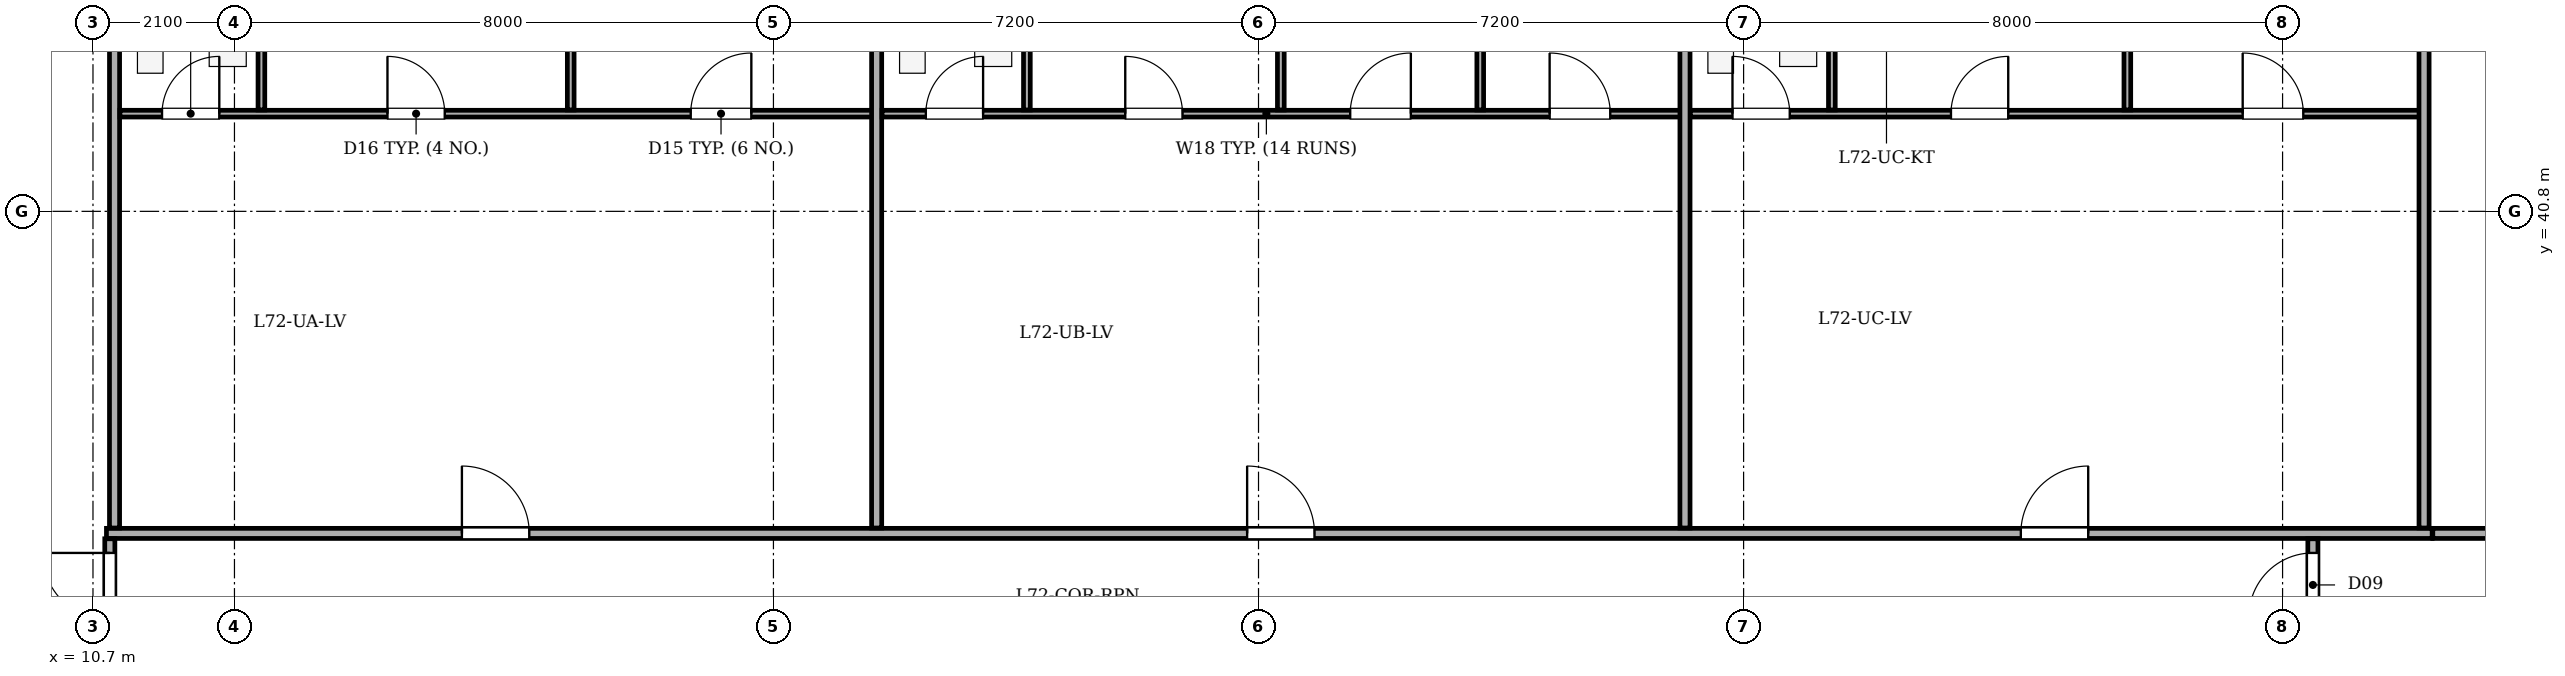
"""IFC4 building model, lengths in metres.
Left out: names, types, materials, properties, quantities, classifications, styles, units other than length and angle.
Written with IfcOpenShell. Run it as: python <this file> out.ifc"""

import sys

from ifc_helpers import new_model, si_unit, direction, frame, frame_2d, origin, place, context, subcontext, project, spatial, rectangle, extrude, element, fill, save


model = new_model("IFC4")
c1 = context("Model", 3, precision=1e-05, world=origin(), true_north=direction((0.0, 1.0)))
c2 = subcontext(c1, "Body", "Model", "MODEL_VIEW")
j1 = project(units=[si_unit("LENGTHUNIT", "METRE"), si_unit("PLANEANGLEUNIT", "RADIAN")], contexts=[c1])
p1 = place(None, origin())
s1 = spatial("IfcSite", under=j1, at=p1, CompositionType="ELEMENT")
p2 = place(p1, origin())
s2 = spatial("IfcBuilding", under=s1, at=p2, CompositionType="ELEMENT")
p3 = place(p2, frame((0.0, 0.0, 272.1)))
s3 = spatial("IfcBuildingStorey", under=s2, at=p3, CompositionType="ELEMENT", Elevation=272.1)
p4 = place(p3, frame((45.3, 44.92, 0.0), z_axis=(0.0, 0.0, 1.0), x_axis=(0.70712937715, -0.707084184501, 0.0)))
e1 = element("IfcWall", 1, at=p4, inside=s3, PredefinedType="STANDARD", context=c2, shape_type="SweptSolid", body=[
    extrude(rectangle(XDim=5.402, YDim=0.32, at=frame_2d((2.701, 0.0))), origin(), (0.0, 0.0, 1.0), 2.725),
])
p5 = place(p4, frame((2.001, 0.0, 0.75)))
e2 = element("IfcOpeningElement", 2, at=p5, cuts=e1, PredefinedType="OPENING", context=c2, shape_type="SweptSolid", body=[
    extrude(rectangle(XDim=1.4, YDim=1.65, at=frame_2d((0.7, 0.825))), frame((0.0, 0.17, 0.0), z_axis=(0.0, -1.0, 0.0), x_axis=(1.0, 0.0, 0.0)), (0.0, 0.0, 1.0), 0.34),
])
p6 = place(p3, frame((10.9, 36.02, 0.0), z_axis=(0.0, 0.0, 1.0), x_axis=(1.0, 0.0, 0.0)))
e3 = element("IfcWall", 3, at=p6, inside=s3, PredefinedType="PARTITIONING", context=c2, shape_type="SweptSolid", body=[
    extrude(rectangle(XDim=34.52, YDim=0.15, at=frame_2d((17.26, 0.0))), origin(), (0.0, 0.0, 1.0), 3.1),
])
p7 = place(p6, frame((5.276, 0.0, 0.0)))
e4 = element("IfcOpeningElement", 4, at=p7, cuts=e3, PredefinedType="OPENING", context=c2, shape_type="SweptSolid", body=[
    extrude(rectangle(XDim=1.0, YDim=2.1, at=frame_2d((0.5, 1.05))), frame((0.0, 0.085, 0.0), z_axis=(0.0, -1.0, 0.0), x_axis=(1.0, 0.0, 0.0)), (0.0, 0.0, 1.0), 0.17),
])
p8 = place(p6, frame((16.931, 0.0, 0.0)))
e5 = element("IfcOpeningElement", 5, at=p8, cuts=e3, PredefinedType="OPENING", context=c2, shape_type="SweptSolid", body=[
    extrude(rectangle(XDim=1.0, YDim=2.1, at=frame_2d((0.5, 1.05))), frame((0.0, 0.085, 0.0), z_axis=(0.0, -1.0, 0.0), x_axis=(1.0, 0.0, 0.0)), (0.0, 0.0, 1.0), 0.17),
])
p9 = place(p6, frame((28.415, 0.0, 0.0)))
e6 = element("IfcOpeningElement", 6, at=p9, cuts=e3, PredefinedType="OPENING", context=c2, shape_type="SweptSolid", body=[
    extrude(rectangle(XDim=1.0, YDim=2.1, at=frame_2d((0.5, 1.05))), frame((0.0, 0.085, 0.0), z_axis=(0.0, -1.0, 0.0), x_axis=(1.0, 0.0, 0.0)), (0.0, 0.0, 1.0), 0.17),
])
p10 = place(p3, frame((11.02, 36.1, 0.0), z_axis=(0.0, 0.0, 1.0), x_axis=(0.0, 1.0, 0.0)))
e7 = element("IfcWall", 7, at=p10, inside=s3, PredefinedType="PARTITIONING", context=c2, shape_type="SweptSolid", body=[
    extrude(rectangle(XDim=8.655, YDim=0.15, at=frame_2d((4.327, 0.0))), origin(), (0.0, 0.0, 1.0), 3.1),
])
p11 = place(p3, frame((11.1, 42.25, 0.0), z_axis=(0.0, 0.0, 1.0), x_axis=(1.0, 0.0, 0.0)))
e8 = element("IfcWall", 8, at=p11, inside=s3, PredefinedType="PARTITIONING", context=c2, shape_type="SweptSolid", body=[
    extrude(rectangle(XDim=11.272, YDim=0.1, at=frame_2d((5.636, 0.0))), origin(), (0.0, 0.0, 1.0), 3.1),
])
p12 = place(p11, frame((0.625, 0.0, 0.0)))
e9 = element("IfcOpeningElement", 9, at=p12, cuts=e8, PredefinedType="OPENING", context=c2, shape_type="SweptSolid", body=[
    extrude(rectangle(XDim=0.85, YDim=2.05, at=frame_2d((0.425, 1.025))), frame((0.0, 0.06, 0.0), z_axis=(0.0, -1.0, 0.0), x_axis=(1.0, 0.0, 0.0)), (0.0, 0.0, 1.0), 0.12),
])
p13 = place(p11, frame((3.971, 0.0, 0.0)))
e10 = element("IfcOpeningElement", 10, at=p13, cuts=e8, PredefinedType="OPENING", context=c2, shape_type="SweptSolid", body=[
    extrude(rectangle(XDim=0.85, YDim=2.05, at=frame_2d((0.425, 1.025))), frame((0.0, 0.06, 0.0), z_axis=(0.0, -1.0, 0.0), x_axis=(1.0, 0.0, 0.0)), (0.0, 0.0, 1.0), 0.12),
])
p14 = place(p11, frame((8.472, 0.0, 0.0)))
e11 = element("IfcOpeningElement", 11, at=p14, cuts=e8, PredefinedType="OPENING", context=c2, shape_type="SweptSolid", body=[
    extrude(rectangle(XDim=0.9, YDim=2.05, at=frame_2d((0.45, 1.025))), frame((0.0, 0.06, 0.0), z_axis=(0.0, -1.0, 0.0), x_axis=(1.0, 0.0, 0.0)), (0.0, 0.0, 1.0), 0.12),
])
p15 = place(p3, frame((13.2, 42.305, 0.0), z_axis=(0.0, 0.0, 1.0), x_axis=(0.0, 1.0, 0.0)))
e12 = element("IfcWall", 12, at=p15, inside=s3, PredefinedType="PARTITIONING", context=c2, shape_type="SweptSolid", body=[
    extrude(rectangle(XDim=2.45, YDim=0.1, at=frame_2d((1.225, 0.0))), origin(), (0.0, 0.0, 1.0), 3.1),
])
p16 = place(p3, frame((17.791, 42.305, 0.0), z_axis=(0.0, 0.0, 1.0), x_axis=(0.0, 1.0, 0.0)))
e13 = element("IfcWall", 13, at=p16, inside=s3, PredefinedType="PARTITIONING", context=c2, shape_type="SweptSolid", body=[
    extrude(rectangle(XDim=2.45, YDim=0.1, at=frame_2d((1.225, 0.0))), origin(), (0.0, 0.0, 1.0), 2.725),
])
p17 = place(p3, frame((22.332, 36.1, 0.0), z_axis=(0.0, 0.0, 1.0), x_axis=(0.0, 1.0, 0.0)))
e14 = element("IfcWall", 14, at=p17, inside=s3, PredefinedType="PARTITIONING", context=c2, shape_type="SweptSolid", body=[
    extrude(rectangle(XDim=8.655, YDim=0.15, at=frame_2d((4.327, 0.0))), origin(), (0.0, 0.0, 1.0), 2.725),
])
p18 = place(p3, frame((22.412, 42.25, 0.0), z_axis=(0.0, 0.0, 1.0), x_axis=(1.0, 0.0, 0.0)))
e15 = element("IfcWall", 15, at=p18, inside=s3, PredefinedType="PARTITIONING", context=c2, shape_type="SweptSolid", body=[
    extrude(rectangle(XDim=11.958, YDim=0.1, at=frame_2d((5.979, 0.0))), origin(), (0.0, 0.0, 1.0), 3.1),
])
p19 = place(p18, frame((0.65, 0.0, 0.0)))
e16 = element("IfcOpeningElement", 16, at=p19, cuts=e15, PredefinedType="OPENING", context=c2, shape_type="SweptSolid", body=[
    extrude(rectangle(XDim=0.85, YDim=2.05, at=frame_2d((0.425, 1.025))), frame((0.0, 0.06, 0.0), z_axis=(0.0, -1.0, 0.0), x_axis=(1.0, 0.0, 0.0)), (0.0, 0.0, 1.0), 0.12),
])
p20 = place(p18, frame((3.61, 0.0, 0.0)))
e17 = element("IfcOpeningElement", 17, at=p20, cuts=e15, PredefinedType="OPENING", context=c2, shape_type="SweptSolid", body=[
    extrude(rectangle(XDim=0.85, YDim=2.05, at=frame_2d((0.425, 1.025))), frame((0.0, 0.06, 0.0), z_axis=(0.0, -1.0, 0.0), x_axis=(1.0, 0.0, 0.0)), (0.0, 0.0, 1.0), 0.12),
])
p21 = place(p18, frame((6.949, 0.0, 0.0)))
e18 = element("IfcOpeningElement", 18, at=p21, cuts=e15, PredefinedType="OPENING", context=c2, shape_type="SweptSolid", body=[
    extrude(rectangle(XDim=0.9, YDim=2.05, at=frame_2d((0.45, 1.025))), frame((0.0, 0.06, 0.0), z_axis=(0.0, -1.0, 0.0), x_axis=(1.0, 0.0, 0.0)), (0.0, 0.0, 1.0), 0.12),
])
p22 = place(p18, frame((9.909, 0.0, 0.0)))
e19 = element("IfcOpeningElement", 19, at=p22, cuts=e15, PredefinedType="OPENING", context=c2, shape_type="SweptSolid", body=[
    extrude(rectangle(XDim=0.9, YDim=2.05, at=frame_2d((0.45, 1.025))), frame((0.0, 0.06, 0.0), z_axis=(0.0, -1.0, 0.0), x_axis=(1.0, 0.0, 0.0)), (0.0, 0.0, 1.0), 0.12),
])
for number, where, z_axis, x_axis in (
    (20, (24.562, 42.305, 0.0), (0.0, 0.0, 1.0), (0.0, 1.0, 0.0)),
    (21, (28.331, 42.305, 0.0), (0.0, 0.0, 1.0), (0.0, 1.0, 0.0)),
    (22, (31.291, 42.305, 0.0), (0.0, 0.0, 1.0), (0.0, 1.0, 0.0)),
):
    element("IfcWall", number, at=place(p3, frame(where, z_axis=z_axis, x_axis=x_axis)), inside=s3, PredefinedType="PARTITIONING", context=c2, shape_type="SweptSolid", body=[
        extrude(rectangle(XDim=2.45, YDim=0.1, at=frame_2d((1.225, 0.0))), origin(), (0.0, 0.0, 1.0), 3.1),
    ])
p23 = place(p3, frame((34.33, 36.1, 0.0), z_axis=(0.0, 0.0, 1.0), x_axis=(0.0, 1.0, 0.0)))
e23 = element("IfcWall", 23, at=p23, inside=s3, PredefinedType="PARTITIONING", context=c2, shape_type="SweptSolid", body=[
    extrude(rectangle(XDim=8.655, YDim=0.15, at=frame_2d((4.327, 0.0))), origin(), (0.0, 0.0, 1.0), 3.1),
])
p24 = place(p3, frame((34.41, 42.25, 0.0), z_axis=(0.0, 0.0, 1.0), x_axis=(1.0, 0.0, 0.0)))
e24 = element("IfcWall", 24, at=p24, inside=s3, PredefinedType="PARTITIONING", context=c2, shape_type="SweptSolid", body=[
    extrude(rectangle(XDim=10.93, YDim=0.1, at=frame_2d((5.465, 0.0))), origin(), (0.0, 0.0, 1.0), 3.1),
])
p25 = place(p24, frame((0.625, 0.0, 0.0)))
e25 = element("IfcOpeningElement", 25, at=p25, cuts=e24, PredefinedType="OPENING", context=c2, shape_type="SweptSolid", body=[
    extrude(rectangle(XDim=0.85, YDim=2.05, at=frame_2d((0.425, 1.025))), frame((0.0, 0.06, 0.0), z_axis=(0.0, -1.0, 0.0), x_axis=(1.0, 0.0, 0.0)), (0.0, 0.0, 1.0), 0.12),
])
p26 = place(p24, frame((3.868, 0.0, 0.0)))
e26 = element("IfcOpeningElement", 26, at=p26, cuts=e24, PredefinedType="OPENING", context=c2, shape_type="SweptSolid", body=[
    extrude(rectangle(XDim=0.85, YDim=2.05, at=frame_2d((0.425, 1.025))), frame((0.0, 0.06, 0.0), z_axis=(0.0, -1.0, 0.0), x_axis=(1.0, 0.0, 0.0)), (0.0, 0.0, 1.0), 0.12),
])
p27 = place(p24, frame((8.198, 0.0, 0.0)))
e27 = element("IfcOpeningElement", 27, at=p27, cuts=e24, PredefinedType="OPENING", context=c2, shape_type="SweptSolid", body=[
    extrude(rectangle(XDim=0.9, YDim=2.05, at=frame_2d((0.45, 1.025))), frame((0.0, 0.06, 0.0), z_axis=(0.0, -1.0, 0.0), x_axis=(1.0, 0.0, 0.0)), (0.0, 0.0, 1.0), 0.12),
])
p28 = place(p3, frame((36.51, 42.305, 0.0), z_axis=(0.0, 0.0, 1.0), x_axis=(0.0, 1.0, 0.0)))
e28 = element("IfcWall", 28, at=p28, inside=s3, PredefinedType="PARTITIONING", context=c2, shape_type="SweptSolid", body=[
    extrude(rectangle(XDim=2.45, YDim=0.1, at=frame_2d((1.225, 0.0))), origin(), (0.0, 0.0, 1.0), 2.725),
])
p29 = place(p3, frame((40.896, 42.305, 0.0), z_axis=(0.0, 0.0, 1.0), x_axis=(0.0, 1.0, 0.0)))
e29 = element("IfcWall", 29, at=p29, inside=s3, PredefinedType="PARTITIONING", context=c2, shape_type="SweptSolid", body=[
    extrude(rectangle(XDim=2.45, YDim=0.1, at=frame_2d((1.225, 0.0))), origin(), (0.0, 0.0, 1.0), 3.1),
])
p30 = place(p3, frame((45.3, 36.1, 0.0), z_axis=(0.0, 0.0, 1.0), x_axis=(0.0, 1.0, 0.0)))
e30 = element("IfcWall", 30, at=p30, inside=s3, PredefinedType="PARTITIONING", context=c2, shape_type="SweptSolid", body=[
    extrude(rectangle(XDim=8.655, YDim=0.15, at=frame_2d((4.327, 0.0))), origin(), (0.0, 0.0, 1.0), 3.1),
])
p31 = place(p3, frame((10.95, 34.15, 0.0), z_axis=(0.0, 0.0, 1.0), x_axis=(0.0, 1.0, 0.0)))
e31 = element("IfcWall", 31, at=p31, inside=s3, PredefinedType="PARTITIONING", context=c2, shape_type="SweptSolid", body=[
    extrude(rectangle(XDim=1.79, YDim=0.15, at=frame_2d((0.895, 0.0))), origin(), (0.0, 0.0, 1.0), 3.1),
])
p32 = place(p31, frame((0.58, 0.0, 0.0)))
e32 = element("IfcOpeningElement", 32, at=p32, cuts=e31, PredefinedType="OPENING", context=c2, shape_type="SweptSolid", body=[
    extrude(rectangle(XDim=1.0, YDim=2.1, at=frame_2d((0.5, 1.05))), frame((0.0, 0.085, 0.0), z_axis=(0.0, -1.0, 0.0), x_axis=(1.0, 0.0, 0.0)), (0.0, 0.0, 1.0), 0.17),
])
p33 = place(p3, frame((45.43, 36.02, 0.0), z_axis=(0.0, 0.0, 1.0), x_axis=(1.0, 0.0, 0.0)))
e33 = element("IfcWall", 33, at=p33, inside=s3, PredefinedType="PARTITIONING", context=c2, shape_type="SweptSolid", body=[
    extrude(rectangle(XDim=3.525, YDim=0.15, at=frame_2d((1.763, 0.0))), origin(), (0.0, 0.0, 1.0), 3.1),
])
p34 = place(p3, frame((43.65, 34.15, 0.0), z_axis=(0.0, 0.0, 1.0), x_axis=(0.0, 1.0, 0.0)))
e34 = element("IfcWall", 34, at=p34, inside=s3, PredefinedType="PARTITIONING", context=c2, shape_type="SweptSolid", body=[
    extrude(rectangle(XDim=1.79, YDim=0.15, at=frame_2d((0.895, 0.0))), origin(), (0.0, 0.0, 1.0), 3.1),
])
p35 = place(p34, frame((0.63, 0.0, 0.0)))
e35 = element("IfcOpeningElement", 35, at=p35, cuts=e34, PredefinedType="OPENING", context=c2, shape_type="SweptSolid", body=[
    extrude(rectangle(XDim=0.95, YDim=2.1, at=frame_2d((0.475, 1.05))), frame((0.0, 0.085, 0.0), z_axis=(0.0, -1.0, 0.0), x_axis=(1.0, 0.0, 0.0)), (0.0, 0.0, 1.0), 0.17),
])
p36 = place(p7, origin())
e36 = element("IfcDoor", 36, at=p36, inside=s3, OperationType="SINGLE_SWING_LEFT", PredefinedType="DOOR", context=c2, shape_type="SweptSolid", body=[
    extrude(rectangle(XDim=1.0, YDim=2.1, at=frame_2d((0.5, 1.05))), frame((0.0, 0.025, 0.0), z_axis=(0.0, -1.0, 0.0), x_axis=(1.0, 0.0, 0.0)), (0.0, 0.0, 1.0), 0.05),
])
fill(e4, e36)
p37 = place(p8, origin())
e37 = element("IfcDoor", 37, at=p37, inside=s3, OperationType="SINGLE_SWING_LEFT", PredefinedType="DOOR", context=c2, shape_type="SweptSolid", body=[
    extrude(rectangle(XDim=1.0, YDim=2.1, at=frame_2d((0.5, 1.05))), frame((0.0, 0.025, 0.0), z_axis=(0.0, -1.0, 0.0), x_axis=(1.0, 0.0, 0.0)), (0.0, 0.0, 1.0), 0.05),
])
fill(e5, e37)
p38 = place(p9, origin())
e38 = element("IfcDoor", 38, at=p38, inside=s3, OperationType="SINGLE_SWING_RIGHT", PredefinedType="DOOR", context=c2, shape_type="SweptSolid", body=[
    extrude(rectangle(XDim=1.0, YDim=2.1, at=frame_2d((0.5, 1.05))), frame((0.0, 0.025, 0.0), z_axis=(0.0, -1.0, 0.0), x_axis=(1.0, 0.0, 0.0)), (0.0, 0.0, 1.0), 0.05),
])
fill(e6, e38)
p39 = place(p12, origin())
e39 = element("IfcDoor", 39, at=p39, inside=s3, OperationType="SINGLE_SWING_RIGHT", PredefinedType="DOOR", context=c2, shape_type="SweptSolid", body=[
    extrude(rectangle(XDim=0.85, YDim=2.05, at=frame_2d((0.425, 1.025))), frame((0.0, 0.025, 0.0), z_axis=(0.0, -1.0, 0.0), x_axis=(1.0, 0.0, 0.0)), (0.0, 0.0, 1.0), 0.05),
])
fill(e9, e39)
p40 = place(p13, origin())
e40 = element("IfcDoor", 40, at=p40, inside=s3, OperationType="SINGLE_SWING_LEFT", PredefinedType="DOOR", context=c2, shape_type="SweptSolid", body=[
    extrude(rectangle(XDim=0.85, YDim=2.05, at=frame_2d((0.425, 1.025))), frame((0.0, 0.025, 0.0), z_axis=(0.0, -1.0, 0.0), x_axis=(1.0, 0.0, 0.0)), (0.0, 0.0, 1.0), 0.05),
])
fill(e10, e40)
p41 = place(p14, origin())
e41 = element("IfcDoor", 41, at=p41, inside=s3, OperationType="SINGLE_SWING_RIGHT", PredefinedType="DOOR", context=c2, shape_type="SweptSolid", body=[
    extrude(rectangle(XDim=0.9, YDim=2.05, at=frame_2d((0.45, 1.025))), frame((0.0, 0.025, 0.0), z_axis=(0.0, -1.0, 0.0), x_axis=(1.0, 0.0, 0.0)), (0.0, 0.0, 1.0), 0.05),
])
fill(e11, e41)
p42 = place(p19, origin())
e42 = element("IfcDoor", 42, at=p42, inside=s3, OperationType="SINGLE_SWING_RIGHT", PredefinedType="DOOR", context=c2, shape_type="SweptSolid", body=[
    extrude(rectangle(XDim=0.85, YDim=2.05, at=frame_2d((0.425, 1.025))), frame((0.0, 0.025, 0.0), z_axis=(0.0, -1.0, 0.0), x_axis=(1.0, 0.0, 0.0)), (0.0, 0.0, 1.0), 0.05),
])
fill(e16, e42)
p43 = place(p20, origin())
e43 = element("IfcDoor", 43, at=p43, inside=s3, OperationType="SINGLE_SWING_LEFT", PredefinedType="DOOR", context=c2, shape_type="SweptSolid", body=[
    extrude(rectangle(XDim=0.85, YDim=2.05, at=frame_2d((0.425, 1.025))), frame((0.0, 0.025, 0.0), z_axis=(0.0, -1.0, 0.0), x_axis=(1.0, 0.0, 0.0)), (0.0, 0.0, 1.0), 0.05),
])
fill(e17, e43)
p44 = place(p21, origin())
e44 = element("IfcDoor", 44, at=p44, inside=s3, OperationType="SINGLE_SWING_RIGHT", PredefinedType="DOOR", context=c2, shape_type="SweptSolid", body=[
    extrude(rectangle(XDim=0.9, YDim=2.05, at=frame_2d((0.45, 1.025))), frame((0.0, 0.025, 0.0), z_axis=(0.0, -1.0, 0.0), x_axis=(1.0, 0.0, 0.0)), (0.0, 0.0, 1.0), 0.05),
])
fill(e18, e44)
p45 = place(p22, origin())
e45 = element("IfcDoor", 45, at=p45, inside=s3, OperationType="SINGLE_SWING_LEFT", PredefinedType="DOOR", context=c2, shape_type="SweptSolid", body=[
    extrude(rectangle(XDim=0.9, YDim=2.05, at=frame_2d((0.45, 1.025))), frame((0.0, 0.025, 0.0), z_axis=(0.0, -1.0, 0.0), x_axis=(1.0, 0.0, 0.0)), (0.0, 0.0, 1.0), 0.05),
])
fill(e19, e45)
p46 = place(p25, origin())
e46 = element("IfcDoor", 46, at=p46, inside=s3, OperationType="SINGLE_SWING_LEFT", PredefinedType="DOOR", context=c2, shape_type="SweptSolid", body=[
    extrude(rectangle(XDim=0.85, YDim=2.05, at=frame_2d((0.425, 1.025))), frame((0.0, 0.025, 0.0), z_axis=(0.0, -1.0, 0.0), x_axis=(1.0, 0.0, 0.0)), (0.0, 0.0, 1.0), 0.05),
])
fill(e25, e46)
p47 = place(p26, origin())
e47 = element("IfcDoor", 47, at=p47, inside=s3, OperationType="SINGLE_SWING_RIGHT", PredefinedType="DOOR", context=c2, shape_type="SweptSolid", body=[
    extrude(rectangle(XDim=0.85, YDim=2.05, at=frame_2d((0.425, 1.025))), frame((0.0, 0.025, 0.0), z_axis=(0.0, -1.0, 0.0), x_axis=(1.0, 0.0, 0.0)), (0.0, 0.0, 1.0), 0.05),
])
fill(e26, e47)
p48 = place(p27, origin())
e48 = element("IfcDoor", 48, at=p48, inside=s3, OperationType="SINGLE_SWING_LEFT", PredefinedType="DOOR", context=c2, shape_type="SweptSolid", body=[
    extrude(rectangle(XDim=0.9, YDim=2.05, at=frame_2d((0.45, 1.025))), frame((0.0, 0.025, 0.0), z_axis=(0.0, -1.0, 0.0), x_axis=(1.0, 0.0, 0.0)), (0.0, 0.0, 1.0), 0.05),
])
fill(e27, e48)
p49 = place(p32, origin())
e49 = element("IfcDoor", 49, at=p49, inside=s3, OperationType="SINGLE_SWING_RIGHT", PredefinedType="DOOR", context=c2, shape_type="SweptSolid", body=[
    extrude(rectangle(XDim=1.0, YDim=2.1, at=frame_2d((0.5, 1.05))), frame((0.0, 0.025, 0.0), z_axis=(0.0, -1.0, 0.0), x_axis=(1.0, 0.0, 0.0)), (0.0, 0.0, 1.0), 0.05),
])
fill(e32, e49)
p50 = place(p35, origin())
e50 = element("IfcDoor", 50, at=p50, inside=s3, OperationType="SINGLE_SWING_LEFT", PredefinedType="DOOR", context=c2, shape_type="SweptSolid", body=[
    extrude(rectangle(XDim=0.95, YDim=2.1, at=frame_2d((0.475, 1.05))), frame((0.0, 0.025, 0.0), z_axis=(0.0, -1.0, 0.0), x_axis=(1.0, 0.0, 0.0)), (0.0, 0.0, 1.0), 0.05),
])
fill(e35, e50)
save(model, sys.argv[1])
